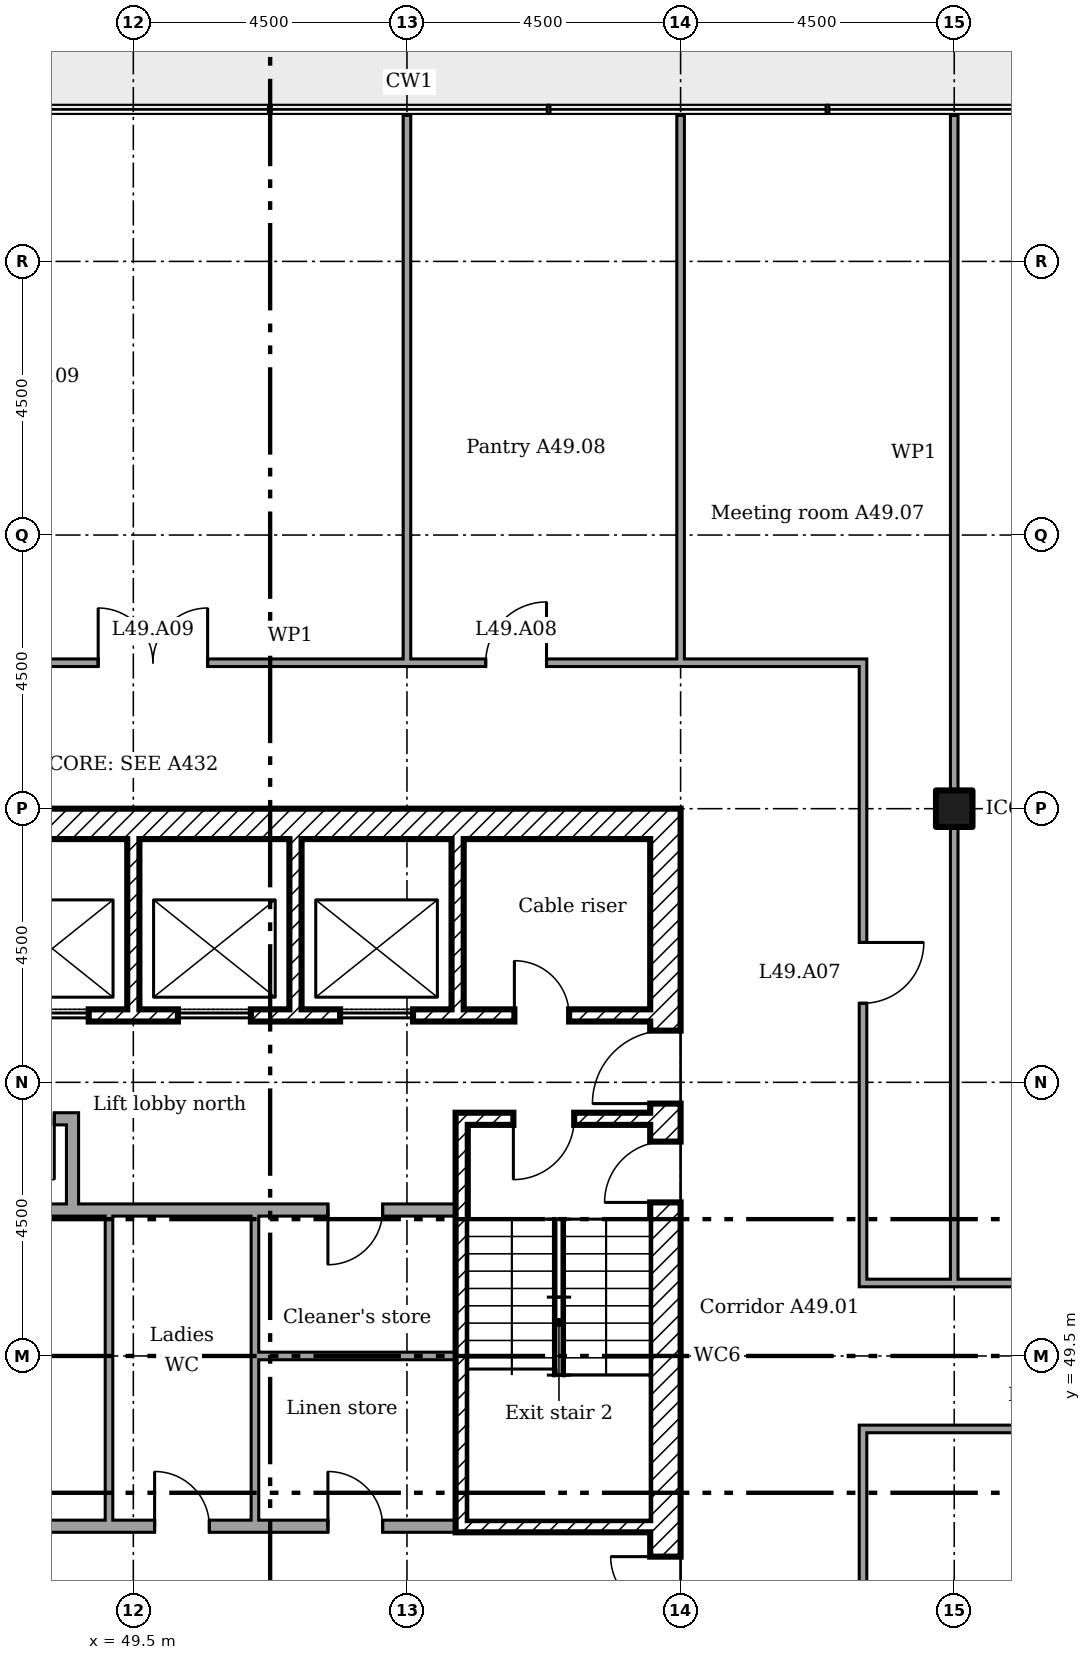
"""IFC4 building model, lengths in metres.
Left out: names, types, materials, properties, quantities, classifications, styles, units other than length and angle.
Written with IfcOpenShell. Run it as: python <this file> out.ifc"""

import sys

from ifc_helpers import new_model, si_unit, direction, frame, frame_2d, origin, origin_2d, place, context, subcontext, project, spatial, rectangle, extrude, element, fill, save


model = new_model("IFC4")
c1 = context("Model", 3, precision=1e-05, world=origin(), true_north=direction((0.0, 1.0)))
c2 = subcontext(c1, "Body", "Model", "MODEL_VIEW")
j1 = project(units=[si_unit("LENGTHUNIT", "METRE"), si_unit("PLANEANGLEUNIT", "RADIAN")], contexts=[c1])
p1 = place(None, origin())
s1 = spatial("IfcSite", under=j1, at=p1, CompositionType="ELEMENT")
p2 = place(p1, origin())
s2 = spatial("IfcBuilding", under=s1, at=p2, CompositionType="ELEMENT")
p3 = place(p2, frame((0.0, 0.0, 195.6)))
s3 = spatial("IfcBuildingStorey", under=s2, at=p3, CompositionType="ELEMENT", Elevation=195.6)
p4 = place(p3, frame((63.0, 58.5, 0.0)))
e1 = element("IfcColumn", 1, at=p4, inside=s3, PredefinedType="COLUMN", context=c2, shape_type="SweptSolid", body=[
    extrude(rectangle(XDim=0.6, YDim=0.6, at=origin_2d()), origin(), (0.0, 0.0, 1.0), 3.6),
])
p5 = place(p3, frame((58.25, 40.5, 0.0), z_axis=(0.0, 0.0, 1.0), x_axis=(0.0, 1.0, 0.0)))
e2 = element("IfcWall", 2, at=p5, inside=s3, PredefinedType="SHEAR", context=c2, shape_type="SweptSolid", body=[
    extrude(rectangle(XDim=18.0, YDim=0.5, at=frame_2d((9.0, 0.0))), origin(), (0.0, 0.0, 1.0), 3.35),
])
p6 = place(p5, frame((13.15, 0.0, 0.0)))
e3 = element("IfcOpeningElement", 3, at=p6, cuts=e2, PredefinedType="OPENING", context=c2, shape_type="SweptSolid", body=[
    extrude(rectangle(XDim=1.2, YDim=2.1, at=frame_2d((0.6, 1.05))), frame((0.0, 0.26, 0.0), z_axis=(0.0, -1.0, 0.0), x_axis=(1.0, 0.0, 0.0)), (0.0, 0.0, 1.0), 0.52),
])
p7 = place(p5, frame((3.9, 0.0, 0.0)))
e4 = element("IfcOpeningElement", 4, at=p7, cuts=e2, PredefinedType="OPENING", context=c2, shape_type="SweptSolid", body=[
    extrude(rectangle(XDim=1.8, YDim=2.1, at=frame_2d((0.9, 1.05))), frame((0.0, 0.26, 0.0), z_axis=(0.0, -1.0, 0.0), x_axis=(1.0, 0.0, 0.0)), (0.0, 0.0, 1.0), 0.52),
])
p8 = place(p5, frame((11.525, 0.0, 0.0)))
e5 = element("IfcOpeningElement", 5, at=p8, cuts=e2, PredefinedType="OPENING", context=c2, shape_type="SweptSolid", body=[
    extrude(rectangle(XDim=1.0, YDim=2.1, at=frame_2d((0.5, 1.05))), frame((0.0, 0.26, 0.0), z_axis=(0.0, -1.0, 0.0), x_axis=(1.0, 0.0, 0.0)), (0.0, 0.0, 1.0), 0.52),
])
p9 = place(p3, frame((40.5, 58.25, 0.0)))
e6 = element("IfcWall", 6, at=p9, inside=s3, PredefinedType="SHEAR", context=c2, shape_type="SweptSolid", body=[
    extrude(rectangle(XDim=17.5, YDim=0.5, at=frame_2d((8.75, 0.0))), origin(), (0.0, 0.0, 1.0), 3.35),
])
for number, where, z_axis, x_axis in (
    (7, (49.5, 58.0, 0.0), (0.0, 0.0, 1.0), (0.0, -1.0, 0.0)),
    (8, (52.167, 58.0, 0.0), (0.0, 0.0, 1.0), (0.0, -1.0, 0.0)),
    (9, (54.833, 58.0, 0.0), (0.0, 0.0, 1.0), (0.0, -1.0, 0.0)),
):
    element("IfcWall", number, at=place(p3, frame(where, z_axis=z_axis, x_axis=x_axis)), inside=s3, PredefinedType="SHEAR", context=c2, shape_type="SweptSolid", body=[
        extrude(rectangle(XDim=2.8, YDim=0.2, at=frame_2d((1.4, 0.0))), origin(), (0.0, 0.0, 1.0), 3.35),
    ])
p10 = place(p3, frame((48.5, 51.9, 0.0), z_axis=(0.0, 0.0, 1.0), x_axis=(0.0, 1.0, 0.0)))
e10 = element("IfcWall", 10, at=p10, inside=s3, PredefinedType="PARTITIONING", context=c2, shape_type="SweptSolid", body=[
    extrude(rectangle(XDim=1.6, YDim=0.2, at=frame_2d((0.8, 0.0))), origin(), (0.0, 0.0, 1.0), 3.35),
])
p11 = place(p3, frame((46.933, 53.4, 0.0)))
e11 = element("IfcWall", 11, at=p11, inside=s3, PredefinedType="PARTITIONING", context=c2, shape_type="SweptSolid", body=[
    extrude(rectangle(XDim=1.467, YDim=0.2, at=frame_2d((0.733, 0.0))), origin(), (0.0, 0.0, 1.0), 3.35),
])
p12 = place(p11, frame((0.267, 0.0, 0.0)))
e12 = element("IfcOpeningElement", 12, at=p12, cuts=e11, PredefinedType="OPENING", context=c2, shape_type="SweptSolid", body=[
    extrude(rectangle(XDim=1.0, YDim=2.1, at=frame_2d((0.5, 1.05))), frame((0.0, 0.11, 0.0), z_axis=(0.0, -1.0, 0.0), x_axis=(1.0, 0.0, 0.0)), (0.0, 0.0, 1.0), 0.22),
])
p13 = place(p3, frame((46.933, 55.1, 0.0)))
e13 = element("IfcWall", 13, at=p13, inside=s3, PredefinedType="SHEAR", context=c2, shape_type="SweptSolid", body=[
    extrude(rectangle(XDim=11.067, YDim=0.2, at=frame_2d((5.533, 0.0))), origin(), (0.0, 0.0, 1.0), 3.35),
])
p14 = place(p13, frame((8.833, 0.0, 0.0)))
e14 = element("IfcOpeningElement", 14, at=p14, cuts=e13, PredefinedType="OPENING", context=c2, shape_type="SweptSolid", body=[
    extrude(rectangle(XDim=0.9, YDim=2.1, at=frame_2d((0.45, 1.05))), frame((0.0, 0.11, 0.0), z_axis=(0.0, -1.0, 0.0), x_axis=(1.0, 0.0, 0.0)), (0.0, 0.0, 1.0), 0.22),
])
p15 = place(p13, frame((0.633, 0.0, 0.0)))
e15 = element("IfcOpeningElement", 15, at=p15, cuts=e13, PredefinedType="OPENING", context=c2, shape_type="SweptSolid", body=[
    extrude(rectangle(XDim=1.2, YDim=2.1, at=frame_2d((0.6, 1.05))), frame((0.0, 0.11, 0.0), z_axis=(0.0, -1.0, 0.0), x_axis=(1.0, 0.0, 0.0)), (0.0, 0.0, 1.0), 0.22),
])
p16 = place(p13, frame((3.3, 0.0, 0.0)))
e16 = element("IfcOpeningElement", 16, at=p16, cuts=e13, PredefinedType="OPENING", context=c2, shape_type="SweptSolid", body=[
    extrude(rectangle(XDim=1.2, YDim=2.1, at=frame_2d((0.6, 1.05))), frame((0.0, 0.11, 0.0), z_axis=(0.0, -1.0, 0.0), x_axis=(1.0, 0.0, 0.0)), (0.0, 0.0, 1.0), 0.22),
])
p17 = place(p13, frame((5.967, 0.0, 0.0)))
e17 = element("IfcOpeningElement", 17, at=p17, cuts=e13, PredefinedType="OPENING", context=c2, shape_type="SweptSolid", body=[
    extrude(rectangle(XDim=1.2, YDim=2.1, at=frame_2d((0.6, 1.05))), frame((0.0, 0.11, 0.0), z_axis=(0.0, -1.0, 0.0), x_axis=(1.0, 0.0, 0.0)), (0.0, 0.0, 1.0), 0.22),
])
p18 = place(p3, frame((54.8, 53.4, 0.0)))
e18 = element("IfcWall", 18, at=p18, inside=s3, PredefinedType="SHEAR", context=c2, shape_type="SweptSolid", body=[
    extrude(rectangle(XDim=3.2, YDim=0.2, at=frame_2d((1.6, 0.0))), origin(), (0.0, 0.0, 1.0), 3.35),
])
p19 = place(p18, frame((0.95, 0.0, 0.0)))
e19 = element("IfcOpeningElement", 19, at=p19, cuts=e18, PredefinedType="OPENING", context=c2, shape_type="SweptSolid", body=[
    extrude(rectangle(XDim=1.0, YDim=2.1, at=frame_2d((0.5, 1.05))), frame((0.0, 0.11, 0.0), z_axis=(0.0, -1.0, 0.0), x_axis=(1.0, 0.0, 0.0)), (0.0, 0.0, 1.0), 0.22),
])
p20 = place(p3, frame((54.8, 46.7, 0.0)))
e20 = element("IfcWall", 20, at=p20, inside=s3, PredefinedType="SHEAR", context=c2, shape_type="SweptSolid", body=[
    extrude(rectangle(XDim=3.2, YDim=0.2, at=frame_2d((1.6, 0.0))), origin(), (0.0, 0.0, 1.0), 3.35),
])
p21 = place(p3, frame((54.9, 46.8, 0.0), z_axis=(0.0, 0.0, 1.0), x_axis=(0.0, 1.0, 0.0)))
e21 = element("IfcWall", 21, at=p21, inside=s3, PredefinedType="SHEAR", context=c2, shape_type="SweptSolid", body=[
    extrude(rectangle(XDim=6.5, YDim=0.2, at=frame_2d((3.25, 0.0))), origin(), (0.0, 0.0, 1.0), 3.35),
])
p22 = place(p3, frame((44.2, 51.9, 0.0)))
e22 = element("IfcWall", 22, at=p22, inside=s3, PredefinedType="PARTITIONING", context=c2, shape_type="SweptSolid", body=[
    extrude(rectangle(XDim=10.6, YDim=0.2, at=frame_2d((5.3, 0.0))), origin(), (0.0, 0.0, 1.0), 3.35),
])
p23 = place(p22, frame((8.5, 0.0, 0.0)))
e23 = element("IfcOpeningElement", 23, at=p23, cuts=e22, PredefinedType="OPENING", context=c2, shape_type="SweptSolid", body=[
    extrude(rectangle(XDim=0.9, YDim=2.1, at=frame_2d((0.45, 1.05))), frame((0.0, 0.11, 0.0), z_axis=(0.0, -1.0, 0.0), x_axis=(1.0, 0.0, 0.0)), (0.0, 0.0, 1.0), 0.22),
])
p24 = place(p3, frame((44.2, 46.7, 0.0)))
e24 = element("IfcWall", 24, at=p24, inside=s3, PredefinedType="PARTITIONING", context=c2, shape_type="SweptSolid", body=[
    extrude(rectangle(XDim=10.6, YDim=0.2, at=frame_2d((5.3, 0.0))), origin(), (0.0, 0.0, 1.0), 3.35),
])
p25 = place(p24, frame((2.0, 0.0, 0.0)))
e25 = element("IfcOpeningElement", 25, at=p25, cuts=e24, PredefinedType="OPENING", context=c2, shape_type="SweptSolid", body=[
    extrude(rectangle(XDim=0.9, YDim=2.1, at=frame_2d((0.45, 1.05))), frame((0.0, 0.11, 0.0), z_axis=(0.0, -1.0, 0.0), x_axis=(1.0, 0.0, 0.0)), (0.0, 0.0, 1.0), 0.22),
])
p26 = place(p24, frame((5.65, 0.0, 0.0)))
e26 = element("IfcOpeningElement", 26, at=p26, cuts=e24, PredefinedType="OPENING", context=c2, shape_type="SweptSolid", body=[
    extrude(rectangle(XDim=0.9, YDim=2.1, at=frame_2d((0.45, 1.05))), frame((0.0, 0.11, 0.0), z_axis=(0.0, -1.0, 0.0), x_axis=(1.0, 0.0, 0.0)), (0.0, 0.0, 1.0), 0.22),
])
p27 = place(p24, frame((8.5, 0.0, 0.0)))
e27 = element("IfcOpeningElement", 27, at=p27, cuts=e24, PredefinedType="OPENING", context=c2, shape_type="SweptSolid", body=[
    extrude(rectangle(XDim=0.9, YDim=2.1, at=frame_2d((0.45, 1.05))), frame((0.0, 0.11, 0.0), z_axis=(0.0, -1.0, 0.0), x_axis=(1.0, 0.0, 0.0)), (0.0, 0.0, 1.0), 0.22),
])
p28 = place(p3, frame((49.1, 46.8, 0.0), z_axis=(0.0, 0.0, 1.0), x_axis=(0.0, 1.0, 0.0)))
e28 = element("IfcWall", 28, at=p28, inside=s3, PredefinedType="PARTITIONING", context=c2, shape_type="SweptSolid", body=[
    extrude(rectangle(XDim=5.0, YDim=0.125, at=frame_2d((2.5, 0.0))), origin(), (0.0, 0.0, 1.0), 3.35),
])
p29 = place(p3, frame((51.5, 46.8, 0.0), z_axis=(0.0, 0.0, 1.0), x_axis=(0.0, 1.0, 0.0)))
e29 = element("IfcWall", 29, at=p29, inside=s3, PredefinedType="PARTITIONING", context=c2, shape_type="SweptSolid", body=[
    extrude(rectangle(XDim=2.762, YDim=0.125, at=frame_2d((1.381, 0.0))), origin(), (0.0, 0.0, 1.0), 3.35),
])
p30 = place(p3, frame((51.562, 49.5, 0.0)))
e30 = element("IfcWall", 30, at=p30, inside=s3, PredefinedType="PARTITIONING", context=c2, shape_type="SweptSolid", body=[
    extrude(rectangle(XDim=3.238, YDim=0.125, at=frame_2d((1.619, 0.0))), origin(), (0.0, 0.0, 1.0), 3.35),
])
p31 = place(p3, frame((51.5, 49.5, 0.0), z_axis=(0.0, 0.0, 1.0), x_axis=(0.0, 1.0, 0.0)))
e31 = element("IfcWall", 31, at=p31, inside=s3, PredefinedType="PARTITIONING", context=c2, shape_type="SweptSolid", body=[
    extrude(rectangle(XDim=2.3, YDim=0.125, at=frame_2d((1.15, 0.0))), origin(), (0.0, 0.0, 1.0), 3.35),
])
p32 = place(p3, frame((61.438, 48.3, 0.0)))
e32 = element("IfcWall", 32, at=p32, inside=s3, PredefinedType="PARTITIONING", context=c2, shape_type="SweptSolid", body=[
    extrude(rectangle(XDim=8.462, YDim=0.125, at=frame_2d((4.231, 0.0))), origin(), (0.0, 0.0, 1.0), 3.45),
])
p33 = place(p32, frame((2.625, 0.0, 0.0)))
e33 = element("IfcOpeningElement", 33, at=p33, cuts=e32, PredefinedType="OPENING", context=c2, shape_type="SweptSolid", body=[
    extrude(rectangle(XDim=1.0, YDim=2.1, at=frame_2d((0.5, 1.05))), frame((0.0, 0.073, 0.0), z_axis=(0.0, -1.0, 0.0), x_axis=(1.0, 0.0, 0.0)), (0.0, 0.0, 1.0), 0.145),
])
p34 = place(p3, frame((61.438, 50.7, 0.0)))
e34 = element("IfcWall", 34, at=p34, inside=s3, PredefinedType="PARTITIONING", context=c2, shape_type="SweptSolid", body=[
    extrude(rectangle(XDim=8.462, YDim=0.125, at=frame_2d((4.231, 0.0))), origin(), (0.0, 0.0, 1.0), 3.45),
])
p35 = place(p34, frame((4.847, 0.0, 0.0)))
e35 = element("IfcOpeningElement", 35, at=p35, cuts=e34, PredefinedType="OPENING", context=c2, shape_type="SweptSolid", body=[
    extrude(rectangle(XDim=1.8, YDim=2.1, at=frame_2d((0.9, 1.05))), frame((0.0, 0.073, 0.0), z_axis=(0.0, -1.0, 0.0), x_axis=(1.0, 0.0, 0.0)), (0.0, 0.0, 1.0), 0.145),
])
p36 = place(p3, frame((42.6, 60.9, 0.0)))
e36 = element("IfcWall", 36, at=p36, inside=s3, PredefinedType="PARTITIONING", context=c2, shape_type="SweptSolid", body=[
    extrude(rectangle(XDim=18.962, YDim=0.125, at=frame_2d((9.481, 0.0))), origin(), (0.0, 0.0, 1.0), 3.45),
])
p37 = place(p36, frame((12.695, 0.0, 0.0)))
e37 = element("IfcOpeningElement", 37, at=p37, cuts=e36, PredefinedType="OPENING", context=c2, shape_type="SweptSolid", body=[
    extrude(rectangle(XDim=1.0, YDim=2.1, at=frame_2d((0.5, 1.05))), frame((0.0, 0.073, 0.0), z_axis=(0.0, -1.0, 0.0), x_axis=(1.0, 0.0, 0.0)), (0.0, 0.0, 1.0), 0.145),
])
p38 = place(p36, frame((6.322, 0.0, 0.0)))
e38 = element("IfcOpeningElement", 38, at=p38, cuts=e36, PredefinedType="OPENING", context=c2, shape_type="SweptSolid", body=[
    extrude(rectangle(XDim=1.8, YDim=2.1, at=frame_2d((0.9, 1.05))), frame((0.0, 0.073, 0.0), z_axis=(0.0, -1.0, 0.0), x_axis=(1.0, 0.0, 0.0)), (0.0, 0.0, 1.0), 0.145),
])
for number, where, z_axis, x_axis in (
    (39, (54.0, 60.9, 0.0), (0.0, 0.0, 1.0), (0.0, 1.0, 0.0)),
    (40, (58.5, 60.9, 0.0), (0.0, 0.0, 1.0), (0.0, 1.0, 0.0)),
):
    element("IfcWall", number, at=place(p3, frame(where, z_axis=z_axis, x_axis=x_axis)), inside=s3, PredefinedType="PARTITIONING", context=c2, shape_type="SweptSolid", body=[
        extrude(rectangle(XDim=9.0, YDim=0.125, at=frame_2d((4.5, 0.0))), origin(), (0.0, 0.0, 1.0), 2.772),
    ])
p39 = place(p3, frame((61.5, 38.462, 0.0), z_axis=(0.0, 0.0, 1.0), x_axis=(0.0, 1.0, 0.0)))
e41 = element("IfcWall", 41, at=p39, inside=s3, PredefinedType="PARTITIONING", context=c2, shape_type="SweptSolid", body=[
    extrude(rectangle(XDim=9.775, YDim=0.125, at=frame_2d((4.888, 0.0))), origin(), (0.0, 0.0, 1.0), 3.45),
])
p40 = place(p3, frame((61.5, 50.762, 0.0), z_axis=(0.0, 0.0, 1.0), x_axis=(0.0, 1.0, 0.0)))
e42 = element("IfcWall", 42, at=p40, inside=s3, PredefinedType="PARTITIONING", context=c2, shape_type="SweptSolid", body=[
    extrude(rectangle(XDim=10.075, YDim=0.125, at=frame_2d((5.038, 0.0))), origin(), (0.0, 0.0, 1.0), 3.45),
])
p41 = place(p40, frame((4.538, 0.0, 0.0)))
e43 = element("IfcOpeningElement", 43, at=p41, cuts=e42, PredefinedType="OPENING", context=c2, shape_type="SweptSolid", body=[
    extrude(rectangle(XDim=1.0, YDim=2.1, at=frame_2d((0.5, 1.05))), frame((0.0, 0.073, 0.0), z_axis=(0.0, -1.0, 0.0), x_axis=(1.0, 0.0, 0.0)), (0.0, 0.0, 1.0), 0.145),
])
p42 = place(p3, frame((63.0, 50.7, 0.0), z_axis=(0.0, 0.0, 1.0), x_axis=(0.0, 1.0, 0.0)))
e44 = element("IfcWall", 44, at=p42, inside=s3, PredefinedType="PARTITIONING", context=c2, shape_type="SweptSolid", body=[
    extrude(rectangle(XDim=7.5, YDim=0.125, at=frame_2d((3.75, 0.0))), origin(), (0.0, 0.0, 1.0), 3.45),
])
p43 = place(p3, frame((63.0, 58.8, 0.0), z_axis=(0.0, 0.0, 1.0), x_axis=(0.0, 1.0, 0.0)))
e45 = element("IfcWall", 45, at=p43, inside=s3, PredefinedType="PARTITIONING", context=c2, shape_type="SweptSolid", body=[
    extrude(rectangle(XDim=11.1, YDim=0.125, at=frame_2d((5.55, 0.0))), origin(), (0.0, 0.0, 1.0), 2.772),
])
p44 = place(p6, origin())
e46 = element("IfcDoor", 46, at=p44, inside=s3, OperationType="SINGLE_SWING_RIGHT", PredefinedType="DOOR", context=c2, shape_type="SweptSolid", body=[
    extrude(rectangle(XDim=1.2, YDim=2.1, at=frame_2d((0.6, 1.05))), frame((0.0, 0.025, 0.0), z_axis=(0.0, -1.0, 0.0), x_axis=(1.0, 0.0, 0.0)), (0.0, 0.0, 1.0), 0.05),
])
fill(e3, e46)
p45 = place(p7, origin())
e47 = element("IfcDoor", 47, at=p45, inside=s3, OperationType="DOUBLE_DOOR_SINGLE_SWING", PredefinedType="DOOR", context=c2, shape_type="SweptSolid", body=[
    extrude(rectangle(XDim=1.8, YDim=2.1, at=frame_2d((0.9, 1.05))), frame((0.0, 0.025, 0.0), z_axis=(0.0, -1.0, 0.0), x_axis=(1.0, 0.0, 0.0)), (0.0, 0.0, 1.0), 0.05),
])
fill(e4, e47)
p46 = place(p19, frame((1.0, 0.0, 0.0), x_axis=(-1.0, 0.0, 0.0)))
e48 = element("IfcDoor", 48, at=p46, inside=s3, OperationType="SINGLE_SWING_LEFT", PredefinedType="DOOR", context=c2, shape_type="SweptSolid", body=[
    extrude(rectangle(XDim=1.0, YDim=2.1, at=frame_2d((0.5, 1.05))), frame((0.0, 0.025, 0.0), z_axis=(0.0, -1.0, 0.0), x_axis=(1.0, 0.0, 0.0)), (0.0, 0.0, 1.0), 0.05),
])
fill(e19, e48)
p47 = place(p8, origin())
e49 = element("IfcDoor", 49, at=p47, inside=s3, OperationType="SINGLE_SWING_RIGHT", PredefinedType="DOOR", context=c2, shape_type="SweptSolid", body=[
    extrude(rectangle(XDim=1.0, YDim=2.1, at=frame_2d((0.5, 1.05))), frame((0.0, 0.025, 0.0), z_axis=(0.0, -1.0, 0.0), x_axis=(1.0, 0.0, 0.0)), (0.0, 0.0, 1.0), 0.05),
])
fill(e5, e49)
p48 = place(p12, frame((1.0, 0.0, 0.0), x_axis=(-1.0, 0.0, 0.0)))
e50 = element("IfcDoor", 50, at=p48, inside=s3, OperationType="SINGLE_SWING_RIGHT", PredefinedType="DOOR", context=c2, shape_type="SweptSolid", body=[
    extrude(rectangle(XDim=1.0, YDim=2.1, at=frame_2d((0.5, 1.05))), frame((0.0, 0.025, 0.0), z_axis=(0.0, -1.0, 0.0), x_axis=(1.0, 0.0, 0.0)), (0.0, 0.0, 1.0), 0.05),
])
fill(e12, e50)
p49 = place(p14, origin())
e51 = element("IfcDoor", 51, at=p49, inside=s3, OperationType="SINGLE_SWING_RIGHT", PredefinedType="DOOR", context=c2, shape_type="SweptSolid", body=[
    extrude(rectangle(XDim=0.9, YDim=2.1, at=frame_2d((0.45, 1.05))), frame((0.0, 0.025, 0.0), z_axis=(0.0, -1.0, 0.0), x_axis=(1.0, 0.0, 0.0)), (0.0, 0.0, 1.0), 0.05),
])
fill(e14, e51)
p50 = place(p26, origin())
e52 = element("IfcDoor", 52, at=p50, inside=s3, OperationType="SINGLE_SWING_RIGHT", PredefinedType="DOOR", context=c2, shape_type="SweptSolid", body=[
    extrude(rectangle(XDim=0.9, YDim=2.1, at=frame_2d((0.45, 1.05))), frame((0.0, 0.025, 0.0), z_axis=(0.0, -1.0, 0.0), x_axis=(1.0, 0.0, 0.0)), (0.0, 0.0, 1.0), 0.05),
])
fill(e26, e52)
p51 = place(p23, frame((0.9, 0.0, 0.0), x_axis=(-1.0, 0.0, 0.0)))
e53 = element("IfcDoor", 53, at=p51, inside=s3, OperationType="SINGLE_SWING_LEFT", PredefinedType="DOOR", context=c2, shape_type="SweptSolid", body=[
    extrude(rectangle(XDim=0.9, YDim=2.1, at=frame_2d((0.45, 1.05))), frame((0.0, 0.025, 0.0), z_axis=(0.0, -1.0, 0.0), x_axis=(1.0, 0.0, 0.0)), (0.0, 0.0, 1.0), 0.05),
])
fill(e23, e53)
p52 = place(p27, origin())
e54 = element("IfcDoor", 54, at=p52, inside=s3, OperationType="SINGLE_SWING_RIGHT", PredefinedType="DOOR", context=c2, shape_type="SweptSolid", body=[
    extrude(rectangle(XDim=0.9, YDim=2.1, at=frame_2d((0.45, 1.05))), frame((0.0, 0.025, 0.0), z_axis=(0.0, -1.0, 0.0), x_axis=(1.0, 0.0, 0.0)), (0.0, 0.0, 1.0), 0.05),
])
fill(e27, e54)
p53 = place(p15, origin())
e55 = element("IfcDoor", 55, at=p53, inside=s3, OperationType="SLIDING_TO_LEFT", PredefinedType="DOOR", context=c2, shape_type="SweptSolid", body=[
    extrude(rectangle(XDim=1.2, YDim=2.1, at=frame_2d((0.6, 1.05))), frame((0.0, 0.025, 0.0), z_axis=(0.0, -1.0, 0.0), x_axis=(1.0, 0.0, 0.0)), (0.0, 0.0, 1.0), 0.05),
])
fill(e15, e55)
p54 = place(p16, origin())
e56 = element("IfcDoor", 56, at=p54, inside=s3, OperationType="SLIDING_TO_LEFT", PredefinedType="DOOR", context=c2, shape_type="SweptSolid", body=[
    extrude(rectangle(XDim=1.2, YDim=2.1, at=frame_2d((0.6, 1.05))), frame((0.0, 0.025, 0.0), z_axis=(0.0, -1.0, 0.0), x_axis=(1.0, 0.0, 0.0)), (0.0, 0.0, 1.0), 0.05),
])
fill(e16, e56)
p55 = place(p17, origin())
e57 = element("IfcDoor", 57, at=p55, inside=s3, OperationType="SLIDING_TO_LEFT", PredefinedType="DOOR", context=c2, shape_type="SweptSolid", body=[
    extrude(rectangle(XDim=1.2, YDim=2.1, at=frame_2d((0.6, 1.05))), frame((0.0, 0.025, 0.0), z_axis=(0.0, -1.0, 0.0), x_axis=(1.0, 0.0, 0.0)), (0.0, 0.0, 1.0), 0.05),
])
fill(e17, e57)
p56 = place(p41, frame((1.0, 0.0, 0.0), x_axis=(-1.0, 0.0, 0.0)))
e58 = element("IfcDoor", 58, at=p56, inside=s3, OperationType="SINGLE_SWING_RIGHT", PredefinedType="DOOR", context=c2, shape_type="SweptSolid", body=[
    extrude(rectangle(XDim=1.0, YDim=2.1, at=frame_2d((0.5, 1.05))), frame((0.0, 0.025, 0.0), z_axis=(0.0, -1.0, 0.0), x_axis=(1.0, 0.0, 0.0)), (0.0, 0.0, 1.0), 0.05),
])
fill(e43, e58)
p57 = place(p37, origin())
e59 = element("IfcDoor", 59, at=p57, inside=s3, OperationType="SINGLE_SWING_LEFT", PredefinedType="DOOR", context=c2, shape_type="SweptSolid", body=[
    extrude(rectangle(XDim=1.0, YDim=2.1, at=frame_2d((0.5, 1.05))), frame((0.0, 0.025, 0.0), z_axis=(0.0, -1.0, 0.0), x_axis=(1.0, 0.0, 0.0)), (0.0, 0.0, 1.0), 0.05),
])
fill(e37, e59)
p58 = place(p38, origin())
e60 = element("IfcDoor", 60, at=p58, inside=s3, OperationType="DOUBLE_DOOR_SINGLE_SWING", PredefinedType="DOOR", context=c2, shape_type="SweptSolid", body=[
    extrude(rectangle(XDim=1.8, YDim=2.1, at=frame_2d((0.9, 1.05))), frame((0.0, 0.025, 0.0), z_axis=(0.0, -1.0, 0.0), x_axis=(1.0, 0.0, 0.0)), (0.0, 0.0, 1.0), 0.05),
])
fill(e38, e60)
save(model, sys.argv[1])
